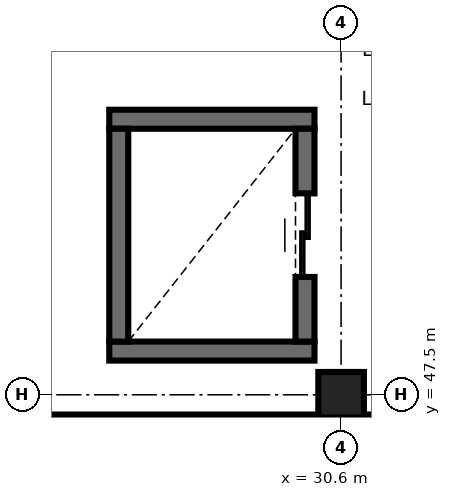
"""IFC4 building model, lengths in metres.
Left out: names, types, materials, properties, quantities, classifications, styles, units other than length and angle.
Written with IfcOpenShell. Run it as: python <this file> out.ifc"""

import sys

from ifc_helpers import new_model, si_unit, direction, frame, frame_2d, origin, origin_2d, place, context, subcontext, project, spatial, rectangle, extrude, element, fill, save


model = new_model("IFC4")
c1 = context("Model", 3, precision=1e-05, world=origin(), true_north=direction((0.0, 1.0)))
c2 = subcontext(c1, "Body", "Model", "MODEL_VIEW")
j1 = project(units=[si_unit("LENGTHUNIT", "METRE"), si_unit("PLANEANGLEUNIT", "RADIAN")], contexts=[c1])
p1 = place(None, origin())
s1 = spatial("IfcSite", under=j1, at=p1, CompositionType="ELEMENT")
p2 = place(p1, origin())
s2 = spatial("IfcBuilding", under=s1, at=p2, CompositionType="ELEMENT")
p3 = place(p2, frame((0.0, 0.0, 22.8)))
s3 = spatial("IfcBuildingStorey", under=s2, at=p3, CompositionType="ELEMENT", Elevation=22.8)
p4 = place(p3, frame((30.6, 47.5, 0.0), z_axis=(0.0, 0.0, 1.0), x_axis=(1.0, 0.0, 0.0)))
e1 = element("IfcColumn", 1, at=p4, inside=s3, PredefinedType="COLUMN", context=c2, shape_type="SweptSolid", body=[
    extrude(rectangle(XDim=0.6, YDim=0.6, at=origin_2d()), origin(), (0.0, 0.0, 1.0), 3.9),
])
for number, where, z_axis, x_axis in (
    (2, (27.55, 48.075, 0.0), (0.0, 0.0, 1.0), (1.0, 0.0, 0.0)),
    (3, (30.25, 51.125, 0.0), (0.0, 0.0, 1.0), (-1.0, 0.0, 0.0)),
):
    element("IfcWall", number, at=place(p3, frame(where, z_axis=z_axis, x_axis=x_axis)), inside=s3, PredefinedType="SHEAR", context=c2, shape_type="SweptSolid", body=[
        extrude(rectangle(XDim=2.7, YDim=0.25, at=frame_2d((1.35, 0.0))), origin(), (0.0, 0.0, 1.0), 3.9),
    ])
p5 = place(p3, frame((27.675, 51.0, 0.0), z_axis=(0.0, 0.0, 1.0), x_axis=(0.0, -1.0, 0.0)))
e4 = element("IfcWall", 4, at=p5, inside=s3, PredefinedType="SHEAR", context=c2, shape_type="SweptSolid", body=[
    extrude(rectangle(XDim=2.8, YDim=0.25, at=frame_2d((1.4, 0.0))), origin(), (0.0, 0.0, 1.0), 3.9),
])
p6 = place(p3, frame((30.125, 48.2, 0.0), z_axis=(0.0, 0.0, 1.0), x_axis=(0.0, 1.0, 0.0)))
e5 = element("IfcWall", 5, at=p6, inside=s3, PredefinedType="SHEAR", context=c2, shape_type="SweptSolid", body=[
    extrude(rectangle(XDim=2.8, YDim=0.25, at=frame_2d((1.4, 0.0))), origin(), (0.0, 0.0, 1.0), 3.9),
])
p7 = place(p6, frame((0.85, 0.0, 0.0)))
e6 = element("IfcOpeningElement", 6, at=p7, cuts=e5, PredefinedType="OPENING", context=c2, shape_type="SweptSolid", body=[
    extrude(rectangle(XDim=1.1, YDim=2.15, at=frame_2d((0.55, 1.075))), frame((0.0, 0.135, 0.0), z_axis=(0.0, -1.0, 0.0), x_axis=(1.0, 0.0, 0.0)), (0.0, 0.0, 1.0), 0.27),
])
p8 = place(p3, frame((14.922, 47.07, 0.0), z_axis=(0.0, 0.0, 1.0), x_axis=(1.0, 0.0, 0.0)))
e7 = element("IfcWall", 7, at=p8, inside=s3, PredefinedType="SOLIDWALL", context=c2, shape_type="SweptSolid", body=[
    extrude(rectangle(XDim=32.478, YDim=0.34, at=frame_2d((16.239, 0.0))), origin(), (0.0, 0.0, 1.0), 3.68),
])
p9 = place(p8, frame((16.608, 0.0, 0.9)))
e8 = element("IfcOpeningElement", 8, at=p9, cuts=e7, PredefinedType="OPENING", context=c2, shape_type="SweptSolid", body=[
    extrude(rectangle(XDim=1.8, YDim=1.5, at=frame_2d((0.9, 0.75))), frame((0.0, 0.18, 0.0), z_axis=(0.0, -1.0, 0.0), x_axis=(1.0, 0.0, 0.0)), (0.0, 0.0, 1.0), 0.36),
])
p10 = place(p8, frame((20.708, 0.0, 0.9)))
e9 = element("IfcOpeningElement", 9, at=p10, cuts=e7, PredefinedType="OPENING", context=c2, shape_type="SweptSolid", body=[
    extrude(rectangle(XDim=1.2, YDim=2.4, at=frame_2d((0.6, 1.2))), frame((0.0, 0.18, 0.0), z_axis=(0.0, -1.0, 0.0), x_axis=(1.0, 0.0, 0.0)), (0.0, 0.0, 1.0), 0.36),
])
p11 = place(p8, frame((26.678, 0.0, 0.9)))
e10 = element("IfcOpeningElement", 10, at=p11, cuts=e7, PredefinedType="OPENING", context=c2, shape_type="SweptSolid", body=[
    extrude(rectangle(XDim=2.0, YDim=2.4, at=frame_2d((1.0, 1.2))), frame((0.0, 0.18, 0.0), z_axis=(0.0, -1.0, 0.0), x_axis=(1.0, 0.0, 0.0)), (0.0, 0.0, 1.0), 0.36),
])
p12 = place(p7, origin())
e11 = element("IfcDoor", 11, at=p12, inside=s3, OperationType="DOUBLE_DOOR_SLIDING", PredefinedType="DOOR", context=c2, shape_type="SweptSolid", body=[
    extrude(rectangle(XDim=1.1, YDim=2.15, at=frame_2d((0.55, 1.075))), frame((0.0, 0.025, 0.0), z_axis=(0.0, -1.0, 0.0), x_axis=(1.0, 0.0, 0.0)), (0.0, 0.0, 1.0), 0.05),
])
fill(e6, e11)
save(model, sys.argv[1])
